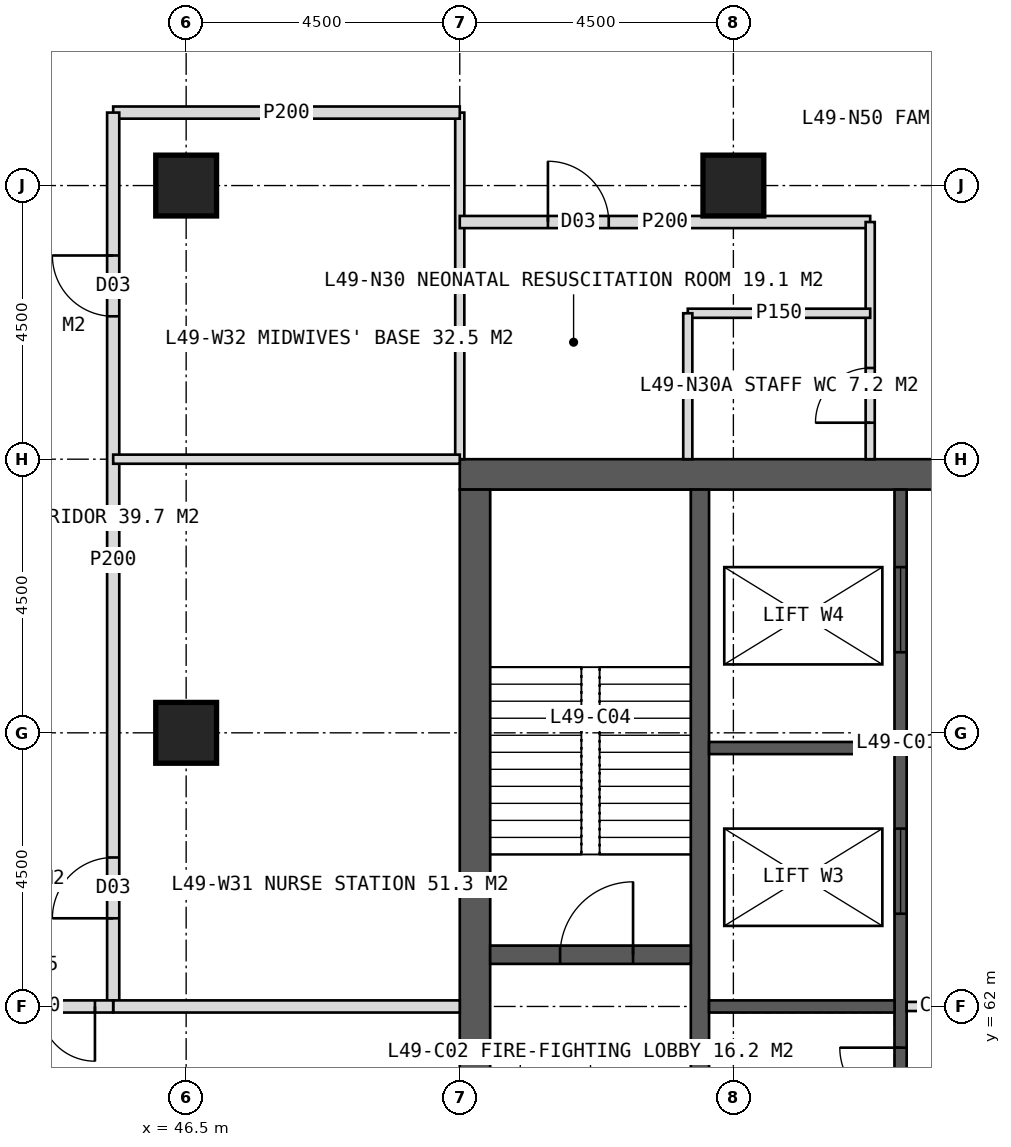
"""IFC4 building model, lengths in metres.
Left out: names, types, materials, properties, quantities, classifications, styles, units other than length and angle.
Written with IfcOpenShell. Run it as: python <this file> out.ifc"""

import sys

from ifc_helpers import new_model, si_unit, direction, frame, frame_2d, origin, origin_2d, place, context, subcontext, project, spatial, rectangle, hollow_rectangle, extrude, element, fill, save


model = new_model("IFC4")
c1 = context("Model", 3, precision=1e-05, world=origin(), true_north=direction((0.0, 1.0)))
c2 = subcontext(c1, "Body", "Model", "MODEL_VIEW")
j1 = project(units=[si_unit("LENGTHUNIT", "METRE"), si_unit("PLANEANGLEUNIT", "RADIAN")], contexts=[c1])
p1 = place(None, origin())
s1 = spatial("IfcSite", under=j1, at=p1, CompositionType="ELEMENT")
p2 = place(p1, origin())
s2 = spatial("IfcBuilding", under=s1, at=p2, CompositionType="ELEMENT")
p3 = place(p2, frame((0.0, 0.0, 205.0)))
s3 = spatial("IfcBuildingStorey", under=s2, at=p3, CompositionType="ELEMENT", Elevation=205.0)
p4 = place(p3, frame((51.0, 70.75, 0.0), z_axis=(0.0, 0.0, 1.0), x_axis=(1.0, 0.0, 0.0)))
e1 = element("IfcWall", 1, at=p4, inside=s3, PredefinedType="SHEAR", context=c2, shape_type="SweptSolid", body=[
    extrude(rectangle(XDim=18.0, YDim=0.5, at=frame_2d((9.0, 0.0))), origin(), (0.0, 0.0, 1.0), 4.0),
])
p5 = place(p4, frame((8.1, 0.0, 0.0)))
e2 = element("IfcOpeningElement", 2, at=p5, cuts=e1, PredefinedType="OPENING", context=c2, shape_type="SweptSolid", body=[
    extrude(rectangle(XDim=1.8, YDim=2.2, at=frame_2d((0.9, 1.1))), frame((0.0, 0.26, 0.0), z_axis=(0.0, -1.0, 0.0), x_axis=(1.0, 0.0, 0.0)), (0.0, 0.0, 1.0), 0.52),
])
p6 = place(p3, frame((51.25, 53.5, 0.0), z_axis=(0.0, 0.0, 1.0), x_axis=(0.0, 1.0, 0.0)))
e3 = element("IfcWall", 3, at=p6, inside=s3, PredefinedType="SHEAR", context=c2, shape_type="SweptSolid", body=[
    extrude(rectangle(XDim=17.0, YDim=0.5, at=frame_2d((8.5, 0.0))), origin(), (0.0, 0.0, 1.0), 4.0),
])
p7 = place(p6, frame((6.1, 0.0, 0.0)))
e4 = element("IfcOpeningElement", 4, at=p7, cuts=e3, PredefinedType="OPENING", context=c2, shape_type="SweptSolid", body=[
    extrude(rectangle(XDim=1.5, YDim=2.2, at=frame_2d((0.75, 1.1))), frame((0.0, 0.26, 0.0), z_axis=(0.0, -1.0, 0.0), x_axis=(1.0, 0.0, 0.0)), (0.0, 0.0, 1.0), 0.52),
])
p8 = place(p3, frame((54.95, 53.5, 0.0), z_axis=(0.0, 0.0, 1.0), x_axis=(0.0, 1.0, 0.0)))
e5 = element("IfcWall", 5, at=p8, inside=s3, PredefinedType="SHEAR", context=c2, shape_type="SweptSolid", body=[
    extrude(rectangle(XDim=17.0, YDim=0.3, at=frame_2d((8.5, 0.0))), origin(), (0.0, 0.0, 1.0), 4.0),
])
p9 = place(p3, frame((58.25, 53.5, 0.0), z_axis=(0.0, 0.0, 1.0), x_axis=(0.0, 1.0, 0.0)))
e6 = element("IfcWall", 6, at=p9, inside=s3, PredefinedType="SHEAR", context=c2, shape_type="SweptSolid", body=[
    extrude(rectangle(XDim=17.0, YDim=0.2, at=frame_2d((8.5, 0.0))), origin(), (0.0, 0.0, 1.0), 4.0),
])
p10 = place(p9, frame((0.808, 0.0, 0.0)))
e7 = element("IfcOpeningElement", 7, at=p10, cuts=e6, PredefinedType="OPENING", context=c2, shape_type="SweptSolid", body=[
    extrude(rectangle(XDim=1.0, YDim=2.1, at=frame_2d((0.5, 1.05))), frame((0.0, 0.11, 0.0), z_axis=(0.0, -1.0, 0.0), x_axis=(1.0, 0.0, 0.0)), (0.0, 0.0, 1.0), 0.22),
])
p11 = place(p9, frame((2.958, 0.0, 0.0)))
e8 = element("IfcOpeningElement", 8, at=p11, cuts=e6, PredefinedType="OPENING", context=c2, shape_type="SweptSolid", body=[
    extrude(rectangle(XDim=1.0, YDim=2.1, at=frame_2d((0.5, 1.05))), frame((0.0, 0.11, 0.0), z_axis=(0.0, -1.0, 0.0), x_axis=(1.0, 0.0, 0.0)), (0.0, 0.0, 1.0), 0.22),
])
p12 = place(p9, frame((4.722, 0.0, 0.0)))
e9 = element("IfcOpeningElement", 9, at=p12, cuts=e6, PredefinedType="OPENING", context=c2, shape_type="SweptSolid", body=[
    extrude(rectangle(XDim=1.0, YDim=2.1, at=frame_2d((0.5, 1.05))), frame((0.0, 0.11, 0.0), z_axis=(0.0, -1.0, 0.0), x_axis=(1.0, 0.0, 0.0)), (0.0, 0.0, 1.0), 0.22),
])
p13 = place(p9, frame((6.823, 0.0, 0.0)))
e10 = element("IfcOpeningElement", 10, at=p13, cuts=e6, PredefinedType="OPENING", context=c2, shape_type="SweptSolid", body=[
    extrude(rectangle(XDim=1.0, YDim=2.1, at=frame_2d((0.5, 1.05))), frame((0.0, 0.11, 0.0), z_axis=(0.0, -1.0, 0.0), x_axis=(1.0, 0.0, 0.0)), (0.0, 0.0, 1.0), 0.22),
])
p14 = place(p9, frame((10.025, 0.0, 0.0)))
e11 = element("IfcOpeningElement", 11, at=p14, cuts=e6, PredefinedType="OPENING", context=c2, shape_type="SweptSolid", body=[
    extrude(rectangle(XDim=1.4, YDim=2.2, at=frame_2d((0.7, 1.1))), frame((0.0, 0.11, 0.0), z_axis=(0.0, -1.0, 0.0), x_axis=(1.0, 0.0, 0.0)), (0.0, 0.0, 1.0), 0.22),
])
p15 = place(p9, frame((14.325, 0.0, 0.0)))
e12 = element("IfcOpeningElement", 12, at=p15, cuts=e6, PredefinedType="OPENING", context=c2, shape_type="SweptSolid", body=[
    extrude(rectangle(XDim=1.4, YDim=2.2, at=frame_2d((0.7, 1.1))), frame((0.0, 0.11, 0.0), z_axis=(0.0, -1.0, 0.0), x_axis=(1.0, 0.0, 0.0)), (0.0, 0.0, 1.0), 0.22),
])
for number, where, z_axis, x_axis in (
    (13, (55.1, 62.0, 0.0), (0.0, 0.0, 1.0), (1.0, 0.0, 0.0)),
    (14, (55.1, 66.25, 0.0), (0.0, 0.0, 1.0), (1.0, 0.0, 0.0)),
):
    element("IfcWall", number, at=place(p3, frame(where, z_axis=z_axis, x_axis=x_axis)), inside=s3, PredefinedType="SHEAR", context=c2, shape_type="SweptSolid", body=[
        extrude(rectangle(XDim=3.05, YDim=0.2, at=frame_2d((1.525, 0.0))), origin(), (0.0, 0.0, 1.0), 4.0),
    ])
p16 = place(p3, frame((51.5, 62.85, 0.0), z_axis=(0.0, 0.0, 1.0), x_axis=(1.0, 0.0, 0.0)))
e15 = element("IfcWall", 15, at=p16, inside=s3, PredefinedType="SHEAR", context=c2, shape_type="SweptSolid", body=[
    extrude(rectangle(XDim=3.3, YDim=0.3, at=frame_2d((1.65, 0.0))), origin(), (0.0, 0.0, 1.0), 4.0),
])
p17 = place(p16, frame((1.15, 0.0, 0.0)))
e16 = element("IfcOpeningElement", 16, at=p17, cuts=e15, PredefinedType="OPENING", context=c2, shape_type="SweptSolid", body=[
    extrude(rectangle(XDim=1.2, YDim=2.1, at=frame_2d((0.6, 1.05))), frame((0.0, 0.16, 0.0), z_axis=(0.0, -1.0, 0.0), x_axis=(1.0, 0.0, 0.0)), (0.0, 0.0, 1.0), 0.32),
])
for number, where, z_axis, x_axis in (
    (17, (46.5, 75.5, 0.0), (0.0, 0.0, 1.0), (1.0, 0.0, 0.0)),
    (18, (55.5, 75.5, 0.0), (0.0, 0.0, 1.0), (1.0, 0.0, 0.0)),
    (19, (46.5, 66.5, 0.0), (0.0, 0.0, 1.0), (1.0, 0.0, 0.0)),
):
    element("IfcColumn", number, at=place(p3, frame(where, z_axis=z_axis, x_axis=x_axis)), inside=s3, PredefinedType="COLUMN", context=c2, shape_type="SweptSolid", body=[
        extrude(hollow_rectangle(XDim=1.0, YDim=1.0, WallThickness=0.1, at=origin_2d()), origin(), (0.0, 0.0, 1.0), 4.0),
    ])
p18 = place(p3, frame((51.0, 71.0, 0.0), z_axis=(0.0, 0.0, 1.0), x_axis=(0.0, 1.0, 0.0)))
e20 = element("IfcWall", 20, at=p18, inside=s3, PredefinedType="PARTITIONING", context=c2, shape_type="SweptSolid", body=[
    extrude(rectangle(XDim=5.7, YDim=0.15, at=frame_2d((2.85, 0.0))), origin(), (0.0, 0.0, 1.0), 3.75),
])
p19 = place(p3, frame((45.3, 76.7, 0.0), z_axis=(0.0, 0.0, 1.0), x_axis=(1.0, 0.0, 0.0)))
e21 = element("IfcWall", 21, at=p19, inside=s3, PredefinedType="PARTITIONING", context=c2, shape_type="SweptSolid", body=[
    extrude(rectangle(XDim=5.7, YDim=0.2, at=frame_2d((2.85, 0.0))), origin(), (0.0, 0.0, 1.0), 3.75),
])
p20 = place(p3, frame((51.0, 74.9, 0.0), z_axis=(0.0, 0.0, 1.0), x_axis=(1.0, 0.0, 0.0)))
e22 = element("IfcWall", 22, at=p20, inside=s3, PredefinedType="PARTITIONING", context=c2, shape_type="SweptSolid", body=[
    extrude(rectangle(XDim=6.75, YDim=0.2, at=frame_2d((3.375, 0.0))), origin(), (0.0, 0.0, 1.0), 3.75),
])
p21 = place(p20, frame((1.45, 0.0, 0.0)))
e23 = element("IfcOpeningElement", 23, at=p21, cuts=e22, PredefinedType="OPENING", context=c2, shape_type="SweptSolid", body=[
    extrude(rectangle(XDim=1.0, YDim=2.1, at=frame_2d((0.5, 1.05))), frame((0.0, 0.11, 0.0), z_axis=(0.0, -1.0, 0.0), x_axis=(1.0, 0.0, 0.0)), (0.0, 0.0, 1.0), 0.22),
])
p22 = place(p3, frame((57.75, 71.0, 0.0), z_axis=(0.0, 0.0, 1.0), x_axis=(0.0, 1.0, 0.0)))
e24 = element("IfcWall", 24, at=p22, inside=s3, PredefinedType="PARTITIONING", context=c2, shape_type="SweptSolid", body=[
    extrude(rectangle(XDim=3.9, YDim=0.15, at=frame_2d((1.95, 0.0))), origin(), (0.0, 0.0, 1.0), 3.75),
])
p23 = place(p22, frame((0.6, 0.0, 0.0)))
e25 = element("IfcOpeningElement", 25, at=p23, cuts=e24, PredefinedType="OPENING", context=c2, shape_type="SweptSolid", body=[
    extrude(rectangle(XDim=0.9, YDim=2.1, at=frame_2d((0.45, 1.05))), frame((0.0, 0.085, 0.0), z_axis=(0.0, -1.0, 0.0), x_axis=(1.0, 0.0, 0.0)), (0.0, 0.0, 1.0), 0.17),
])
p24 = place(p3, frame((54.75, 73.4, 0.0), z_axis=(0.0, 0.0, 1.0), x_axis=(1.0, 0.0, 0.0)))
e26 = element("IfcWall", 26, at=p24, inside=s3, PredefinedType="PARTITIONING", context=c2, shape_type="SweptSolid", body=[
    extrude(rectangle(XDim=3.0, YDim=0.15, at=frame_2d((1.5, 0.0))), origin(), (0.0, 0.0, 1.0), 3.75),
])
p25 = place(p3, frame((54.75, 71.0, 0.0), z_axis=(0.0, 0.0, 1.0), x_axis=(0.0, 1.0, 0.0)))
e27 = element("IfcWall", 27, at=p25, inside=s3, PredefinedType="PARTITIONING", context=c2, shape_type="SweptSolid", body=[
    extrude(rectangle(XDim=2.4, YDim=0.15, at=frame_2d((1.2, 0.0))), origin(), (0.0, 0.0, 1.0), 3.75),
])
p26 = place(p3, frame((45.3, 62.0, 0.0), z_axis=(0.0, 0.0, 1.0), x_axis=(0.0, 1.0, 0.0)))
e28 = element("IfcWall", 28, at=p26, inside=s3, PredefinedType="PARTITIONING", context=c2, shape_type="SweptSolid", body=[
    extrude(rectangle(XDim=14.7, YDim=0.2, at=frame_2d((7.35, 0.0))), origin(), (0.0, 0.0, 1.0), 3.75),
])
p27 = place(p26, frame((1.45, 0.0, 0.0)))
e29 = element("IfcOpeningElement", 29, at=p27, cuts=e28, PredefinedType="OPENING", context=c2, shape_type="SweptSolid", body=[
    extrude(rectangle(XDim=1.0, YDim=2.1, at=frame_2d((0.5, 1.05))), frame((0.0, 0.11, 0.0), z_axis=(0.0, -1.0, 0.0), x_axis=(1.0, 0.0, 0.0)), (0.0, 0.0, 1.0), 0.22),
])
p28 = place(p26, frame((11.35, 0.0, 0.0)))
e30 = element("IfcOpeningElement", 30, at=p28, cuts=e28, PredefinedType="OPENING", context=c2, shape_type="SweptSolid", body=[
    extrude(rectangle(XDim=1.0, YDim=2.1, at=frame_2d((0.5, 1.05))), frame((0.0, 0.11, 0.0), z_axis=(0.0, -1.0, 0.0), x_axis=(1.0, 0.0, 0.0)), (0.0, 0.0, 1.0), 0.22),
])
p29 = place(p3, frame((51.0, 62.0, 0.0), z_axis=(0.0, 0.0, 1.0), x_axis=(-1.0, 0.0, 0.0)))
e31 = element("IfcWall", 31, at=p29, inside=s3, PredefinedType="SOLIDWALL", context=c2, shape_type="SweptSolid", body=[
    extrude(rectangle(XDim=5.7, YDim=0.2, at=frame_2d((2.85, 0.0))), origin(), (0.0, 0.0, 1.0), 2.95),
])
p30 = place(p3, frame((51.0, 71.0, 0.0), z_axis=(0.0, 0.0, 1.0), x_axis=(-1.0, 0.0, 0.0)))
e32 = element("IfcWall", 32, at=p30, inside=s3, PredefinedType="PARTITIONING", context=c2, shape_type="SweptSolid", body=[
    extrude(rectangle(XDim=5.7, YDim=0.15, at=frame_2d((2.85, 0.0))), origin(), (0.0, 0.0, 1.0), 3.75),
])
p31 = place(p3, frame((45.3, 62.0, 0.0), z_axis=(0.0, 0.0, 1.0), x_axis=(-1.0, 0.0, 0.0)))
e33 = element("IfcWall", 33, at=p31, inside=s3, PredefinedType="SOLIDWALL", context=c2, shape_type="SweptSolid", body=[
    extrude(rectangle(XDim=2.7, YDim=0.2, at=frame_2d((1.35, 0.0))), origin(), (0.0, 0.0, 1.0), 2.95),
])
p32 = place(p31, frame((0.3, 0.0, 0.0)))
e34 = element("IfcOpeningElement", 34, at=p32, cuts=e33, PredefinedType="OPENING", context=c2, shape_type="SweptSolid", body=[
    extrude(rectangle(XDim=1.8, YDim=2.2, at=frame_2d((0.9, 1.1))), frame((0.0, 0.11, 0.0), z_axis=(0.0, -1.0, 0.0), x_axis=(1.0, 0.0, 0.0)), (0.0, 0.0, 1.0), 0.22),
])
p33 = place(p3, frame((58.35, 62.0, 0.0), z_axis=(0.0, 0.0, 1.0), x_axis=(1.0, 0.0, 0.0)))
e35 = element("IfcWall", 35, at=p33, inside=s3, PredefinedType="PARTITIONING", context=c2, shape_type="SweptSolid", body=[
    extrude(rectangle(XDim=3.3, YDim=0.15, at=frame_2d((1.65, 0.0))), origin(), (0.0, 0.0, 1.0), 3.75),
])
p34 = place(p23, origin())
e36 = element("IfcDoor", 36, at=p34, inside=s3, OperationType="SINGLE_SWING_LEFT", PredefinedType="DOOR", context=c2, shape_type="SweptSolid", body=[
    extrude(rectangle(XDim=0.9, YDim=2.1, at=frame_2d((0.45, 1.05))), frame((0.0, 0.025, 0.0), z_axis=(0.0, -1.0, 0.0), x_axis=(1.0, 0.0, 0.0)), (0.0, 0.0, 1.0), 0.05),
])
fill(e25, e36)
p35 = place(p21, origin())
e37 = element("IfcDoor", 37, at=p35, inside=s3, OperationType="SINGLE_SWING_LEFT", PredefinedType="DOOR", context=c2, shape_type="SweptSolid", body=[
    extrude(rectangle(XDim=1.0, YDim=2.1, at=frame_2d((0.5, 1.05))), frame((0.0, 0.025, 0.0), z_axis=(0.0, -1.0, 0.0), x_axis=(1.0, 0.0, 0.0)), (0.0, 0.0, 1.0), 0.05),
])
fill(e23, e37)
p36 = place(p27, origin())
e38 = element("IfcDoor", 38, at=p36, inside=s3, OperationType="SINGLE_SWING_LEFT", PredefinedType="DOOR", context=c2, shape_type="SweptSolid", body=[
    extrude(rectangle(XDim=1.0, YDim=2.1, at=frame_2d((0.5, 1.05))), frame((0.0, 0.025, 0.0), z_axis=(0.0, -1.0, 0.0), x_axis=(1.0, 0.0, 0.0)), (0.0, 0.0, 1.0), 0.05),
])
fill(e29, e38)
p37 = place(p28, origin())
e39 = element("IfcDoor", 39, at=p37, inside=s3, OperationType="SINGLE_SWING_RIGHT", PredefinedType="DOOR", context=c2, shape_type="SweptSolid", body=[
    extrude(rectangle(XDim=1.0, YDim=2.1, at=frame_2d((0.5, 1.05))), frame((0.0, 0.025, 0.0), z_axis=(0.0, -1.0, 0.0), x_axis=(1.0, 0.0, 0.0)), (0.0, 0.0, 1.0), 0.05),
])
fill(e30, e39)
p38 = place(p32, origin())
e40 = element("IfcDoor", 40, at=p38, inside=s3, OperationType="DOUBLE_DOOR_DOUBLE_SWING", PredefinedType="DOOR", context=c2, shape_type="SweptSolid", body=[
    extrude(rectangle(XDim=1.8, YDim=2.2, at=frame_2d((0.9, 1.1))), frame((0.0, 0.025, 0.0), z_axis=(0.0, -1.0, 0.0), x_axis=(1.0, 0.0, 0.0)), (0.0, 0.0, 1.0), 0.05),
])
fill(e34, e40)
p39 = place(p7, origin())
e41 = element("IfcDoor", 41, at=p39, inside=s3, OperationType="DOUBLE_DOOR_SINGLE_SWING", PredefinedType="DOOR", context=c2, shape_type="SweptSolid", body=[
    extrude(rectangle(XDim=1.5, YDim=2.2, at=frame_2d((0.75, 1.1))), frame((0.0, 0.025, 0.0), z_axis=(0.0, -1.0, 0.0), x_axis=(1.0, 0.0, 0.0)), (0.0, 0.0, 1.0), 0.05),
])
fill(e4, e41)
p40 = place(p17, origin())
e42 = element("IfcDoor", 42, at=p40, inside=s3, OperationType="SINGLE_SWING_RIGHT", PredefinedType="DOOR", context=c2, shape_type="SweptSolid", body=[
    extrude(rectangle(XDim=1.2, YDim=2.1, at=frame_2d((0.6, 1.05))), frame((0.0, 0.025, 0.0), z_axis=(0.0, -1.0, 0.0), x_axis=(1.0, 0.0, 0.0)), (0.0, 0.0, 1.0), 0.05),
])
fill(e16, e42)
p41 = place(p13, origin())
e43 = element("IfcDoor", 43, at=p41, inside=s3, OperationType="SINGLE_SWING_RIGHT", PredefinedType="DOOR", context=c2, shape_type="SweptSolid", body=[
    extrude(rectangle(XDim=1.0, YDim=2.1, at=frame_2d((0.5, 1.05))), frame((0.0, 0.025, 0.0), z_axis=(0.0, -1.0, 0.0), x_axis=(1.0, 0.0, 0.0)), (0.0, 0.0, 1.0), 0.05),
])
fill(e10, e43)
p42 = place(p14, origin())
e44 = element("IfcDoor", 44, at=p42, inside=s3, OperationType="SLIDING_TO_LEFT", PredefinedType="DOOR", context=c2, shape_type="SweptSolid", body=[
    extrude(rectangle(XDim=1.4, YDim=2.2, at=frame_2d((0.7, 1.1))), frame((0.0, 0.025, 0.0), z_axis=(0.0, -1.0, 0.0), x_axis=(1.0, 0.0, 0.0)), (0.0, 0.0, 1.0), 0.05),
])
fill(e11, e44)
p43 = place(p15, origin())
e45 = element("IfcDoor", 45, at=p43, inside=s3, OperationType="SLIDING_TO_LEFT", PredefinedType="DOOR", context=c2, shape_type="SweptSolid", body=[
    extrude(rectangle(XDim=1.4, YDim=2.2, at=frame_2d((0.7, 1.1))), frame((0.0, 0.025, 0.0), z_axis=(0.0, -1.0, 0.0), x_axis=(1.0, 0.0, 0.0)), (0.0, 0.0, 1.0), 0.05),
])
fill(e12, e45)
save(model, sys.argv[1])
